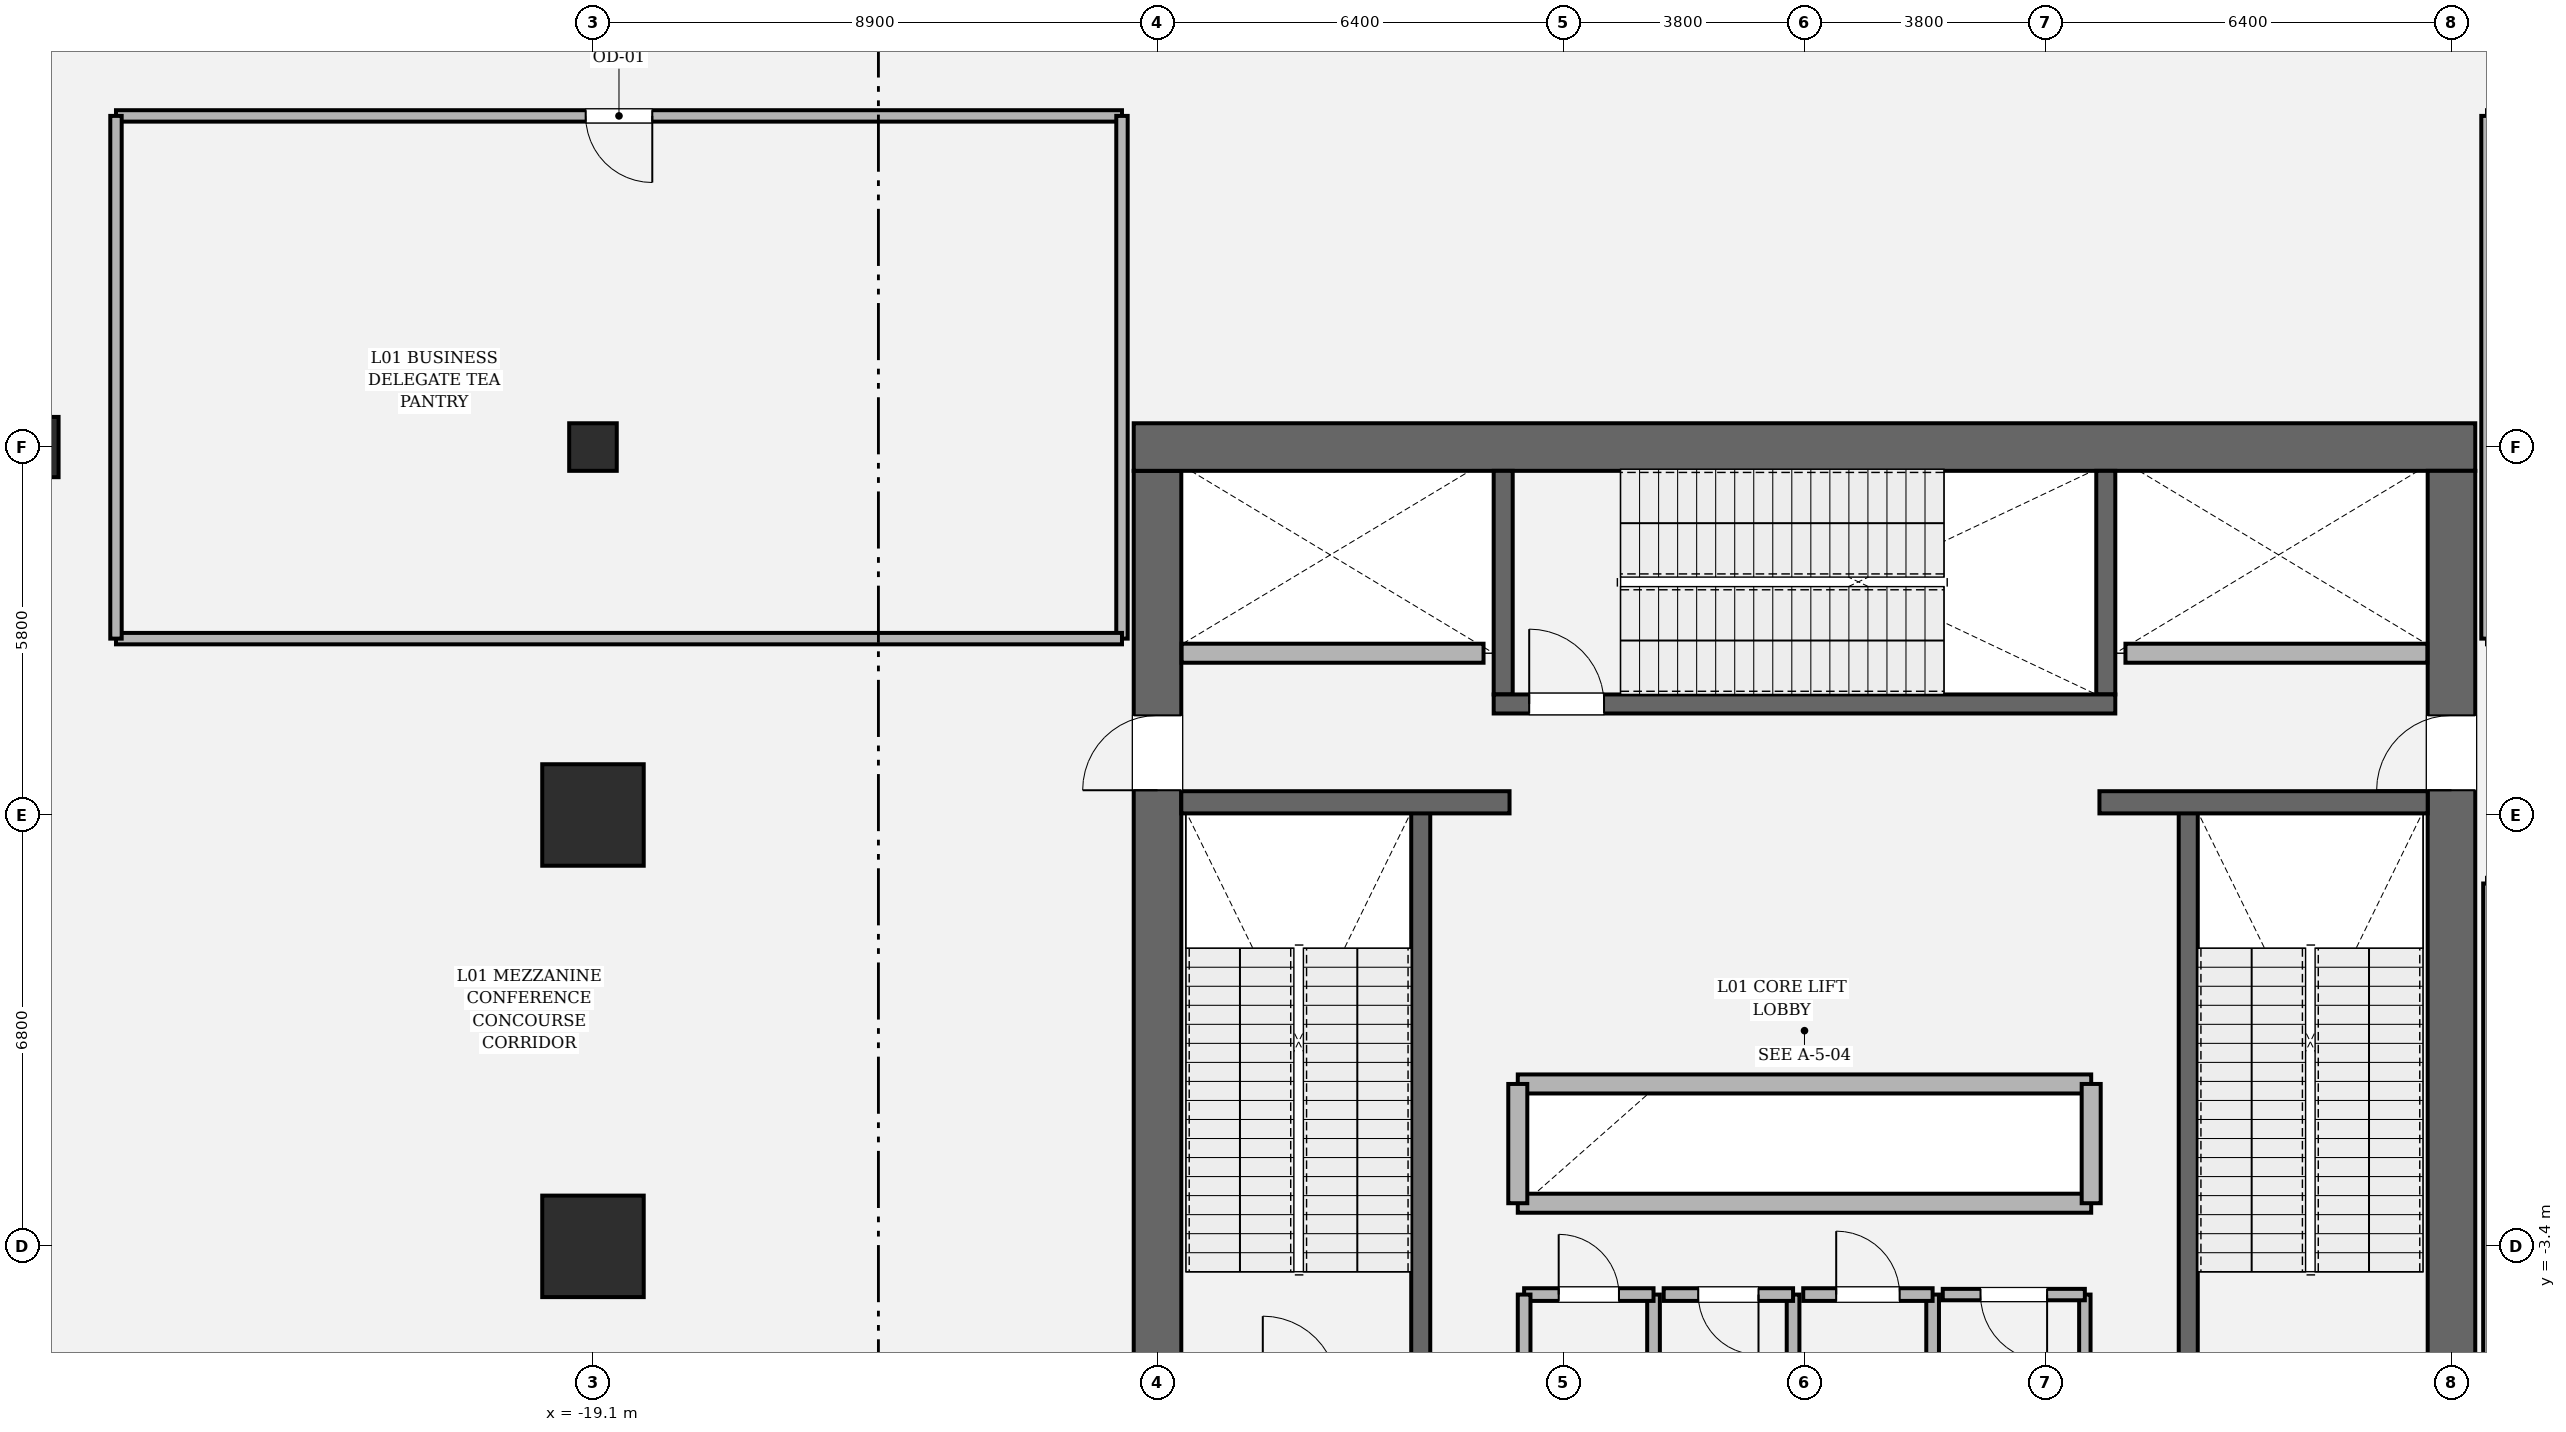
"""IFC4 building model, lengths in metres.
Left out: names, types, materials, properties, quantities, classifications, styles, units other than length and angle.
Written with IfcOpenShell. Run it as: python <this file> out.ifc"""

import sys

from ifc_helpers import new_model, si_unit, direction, frame, frame_2d, origin, origin_2d, place, context, subcontext, project, spatial, rectangle, hollow_rectangle, circle, extrude, element, fill, save


model = new_model("IFC4")
c1 = context("Model", 3, precision=1e-05, world=origin(), true_north=direction((0.0, 1.0)))
c2 = subcontext(c1, "Body", "Model", "MODEL_VIEW")
j1 = project(units=[si_unit("LENGTHUNIT", "METRE"), si_unit("PLANEANGLEUNIT", "RADIAN")], contexts=[c1])
p1 = place(None, origin())
s1 = spatial("IfcSite", under=j1, at=p1, CompositionType="ELEMENT")
p2 = place(p1, origin())
s2 = spatial("IfcBuilding", under=s1, at=p2, CompositionType="ELEMENT")
p3 = place(p2, frame((0.0, 0.0, 6.0)))
s3 = spatial("IfcBuildingStorey", under=s2, at=p3, CompositionType="ELEMENT", Elevation=6.0)
p4 = place(p3, frame((-10.2, -8.825, 0.0), z_axis=(0.0, 0.0, 1.0), x_axis=(0.0, 1.0, 0.0)))
e1 = element("IfcWall", 1, at=p4, inside=s3, PredefinedType="SHEAR", context=c2, shape_type="SweptSolid", body=[
    extrude(rectangle(XDim=17.65, YDim=0.75, at=frame_2d((8.825, 0.0))), origin(), (0.0, 0.0, 1.0), 5.4),
])
p5 = place(p4, frame((12.615, 0.0, 0.0)))
e2 = element("IfcOpeningElement", 2, at=p5, cuts=e1, PredefinedType="OPENING", context=c2, shape_type="SweptSolid", body=[
    extrude(rectangle(XDim=1.18, YDim=2.2, at=frame_2d((0.59, 1.1))), frame((0.0, 0.385, 0.0), z_axis=(0.0, -1.0, 0.0), x_axis=(1.0, 0.0, 0.0)), (0.0, 0.0, 1.0), 0.77),
])
p6 = place(p3, frame((-10.575, 9.2, 0.0), z_axis=(0.0, 0.0, 1.0), x_axis=(1.0, 0.0, 0.0)))
e3 = element("IfcWall", 3, at=p6, inside=s3, PredefinedType="SHEAR", context=c2, shape_type="SweptSolid", body=[
    extrude(rectangle(XDim=21.15, YDim=0.75, at=frame_2d((10.575, 0.0))), origin(), (0.0, 0.0, 1.0), 5.4),
])
p7 = place(p3, frame((10.2, 8.825, 0.0), z_axis=(0.0, 0.0, 1.0), x_axis=(0.0, -1.0, 0.0)))
e4 = element("IfcWall", 4, at=p7, inside=s3, PredefinedType="SHEAR", context=c2, shape_type="SweptSolid", body=[
    extrude(rectangle(XDim=17.65, YDim=0.75, at=frame_2d((8.825, 0.0))), origin(), (0.0, 0.0, 1.0), 5.4),
])
p8 = place(p7, frame((3.855, 0.0, 0.0)))
e5 = element("IfcOpeningElement", 5, at=p8, cuts=e4, PredefinedType="OPENING", context=c2, shape_type="SweptSolid", body=[
    extrude(rectangle(XDim=1.18, YDim=2.2, at=frame_2d((0.59, 1.1))), frame((0.0, 0.385, 0.0), z_axis=(0.0, -1.0, 0.0), x_axis=(1.0, 0.0, 0.0)), (0.0, 0.0, 1.0), 0.77),
])
for number, where, z_axis, x_axis in (
    (6, (-6.05, -5.5, 0.0), (0.0, 0.0, 1.0), (0.0, 1.0, 0.0)),
    (7, (6.05, 3.45, 0.0), (0.0, 0.0, 1.0), (0.0, -1.0, 0.0)),
):
    element("IfcWall", number, at=place(p3, frame(where, z_axis=z_axis, x_axis=x_axis)), inside=s3, PredefinedType="SOLIDWALL", context=c2, shape_type="SweptSolid", body=[
        extrude(rectangle(XDim=8.95, YDim=0.3, at=frame_2d((4.475, 0.0))), origin(), (0.0, 0.0, 1.0), 5.4),
    ])
for number, where, z_axis, x_axis in (
    (8, (-4.75, 5.3, 0.0), (0.0, 0.0, 1.0), (0.0, 1.0, 0.0)),
    (9, (4.75, 8.825, 0.0), (0.0, 0.0, 1.0), (0.0, -1.0, 0.0)),
):
    element("IfcWall", number, at=place(p3, frame(where, z_axis=z_axis, x_axis=x_axis)), inside=s3, PredefinedType="SOLIDWALL", context=c2, shape_type="SweptSolid", body=[
        extrude(rectangle(XDim=3.525, YDim=0.3, at=frame_2d((1.762, 0.0))), origin(), (0.0, 0.0, 1.0), 5.4),
    ])
p9 = place(p3, frame((-4.9, 5.15, 0.0), z_axis=(0.0, 0.0, 1.0), x_axis=(1.0, 0.0, 0.0)))
e10 = element("IfcWall", 10, at=p9, inside=s3, PredefinedType="SOLIDWALL", context=c2, shape_type="SweptSolid", body=[
    extrude(rectangle(XDim=9.8, YDim=0.3, at=frame_2d((4.9, 0.0))), origin(), (0.0, 0.0, 1.0), 5.4),
])
p10 = place(p9, frame((0.56, 0.0, 0.0)))
e11 = element("IfcOpeningElement", 11, at=p10, cuts=e10, PredefinedType="OPENING", context=c2, shape_type="SweptSolid", body=[
    extrude(rectangle(XDim=1.18, YDim=2.2, at=frame_2d((0.59, 1.1))), frame((0.0, 0.16, 0.0), z_axis=(0.0, -1.0, 0.0), x_axis=(1.0, 0.0, 0.0)), (0.0, 0.0, 1.0), 0.32),
])
for number, where, z_axis, x_axis in (
    (12, (-9.825, 3.6, 0.0), (0.0, 0.0, 1.0), (1.0, 0.0, 0.0)),
    (13, (4.65, 3.6, 0.0), (0.0, 0.0, 1.0), (1.0, 0.0, 0.0)),
):
    element("IfcWall", number, at=place(p3, frame(where, z_axis=z_axis, x_axis=x_axis)), inside=s3, PredefinedType="SOLIDWALL", context=c2, shape_type="SweptSolid", body=[
        extrude(rectangle(XDim=5.175, YDim=0.35, at=frame_2d((2.587, 0.0))), origin(), (0.0, 0.0, 1.0), 5.4),
    ])
for number, where, z_axis, x_axis in (
    (14, (-19.1, 3.4, 0.0), (0.0, 0.0, 1.0), (1.0, 0.0, 0.0)),
    (15, (-19.1, -3.4, 0.0), (0.0, 0.0, 1.0), (1.0, 0.0, 0.0)),
):
    element("IfcColumn", number, at=place(p3, frame(where, z_axis=z_axis, x_axis=x_axis)), inside=s3, PredefinedType="COLUMN", context=c2, shape_type="SweptSolid", body=[
        extrude(hollow_rectangle(XDim=1.6, YDim=1.6, WallThickness=0.05, at=origin_2d()), origin(), (0.0, 0.0, 1.0), 5.4),
    ])
p11 = place(p3, frame((-28.0, 9.2, 0.0), z_axis=(0.0, 0.0, 1.0), x_axis=(1.0, 0.0, 0.0)))
e16 = element("IfcColumn", 16, at=p11, inside=s3, PredefinedType="COLUMN", context=c2, shape_type="SweptSolid", body=[
    extrude(rectangle(XDim=0.95, YDim=0.95, at=origin_2d()), origin(), (0.0, 0.0, 1.0), 5.4),
])
p12 = place(p3, frame((-19.1, 9.2, 0.0), z_axis=(0.0, 0.0, 1.0), x_axis=(1.0, 0.0, 0.0)))
e17 = element("IfcColumn", 17, at=p12, inside=s3, PredefinedType="PILASTER", context=c2, shape_type="SweptSolid", body=[
    extrude(circle(Radius=0.375, at=origin_2d()), origin(), (0.0, 0.0, 1.0), 5.4),
])
for number, where, z_axis, x_axis in (
    (18, (-4.52, -0.84, 0.0), (0.0, 0.0, 1.0), (1.0, 0.0, 0.0)),
    (19, (-4.52, -2.72, 0.0), (0.0, 0.0, 1.0), (1.0, 0.0, 0.0)),
):
    element("IfcWall", number, at=place(p3, frame(where, z_axis=z_axis, x_axis=x_axis)), inside=s3, PredefinedType="SOLIDWALL", context=c2, shape_type="SweptSolid", body=[
        extrude(rectangle(XDim=9.04, YDim=0.3, at=frame_2d((4.52, 0.0))), origin(), (0.0, 0.0, 1.0), 5.12),
    ])
for number, where, z_axis, x_axis in (
    (20, (-4.52, -2.72, 0.0), (0.0, 0.0, 1.0), (0.0, 1.0, 0.0)),
    (21, (4.52, -2.72, 0.0), (0.0, 0.0, 1.0), (0.0, 1.0, 0.0)),
):
    element("IfcWall", number, at=place(p3, frame(where, z_axis=z_axis, x_axis=x_axis)), inside=s3, PredefinedType="SOLIDWALL", context=c2, shape_type="SweptSolid", body=[
        extrude(rectangle(XDim=1.88, YDim=0.3, at=frame_2d((0.94, 0.0))), origin(), (0.0, 0.0, 1.0), 5.12),
    ])
for number, where, z_axis, x_axis in (
    (22, (-9.82, 5.95, 0.0), (0.0, 0.0, 1.0), (1.0, 0.0, 0.0)),
    (23, (5.06, 5.95, 0.0), (0.0, 0.0, 1.0), (1.0, 0.0, 0.0)),
):
    element("IfcWall", number, at=place(p3, frame(where, z_axis=z_axis, x_axis=x_axis)), inside=s3, PredefinedType="SOLIDWALL", context=c2, shape_type="SweptSolid", body=[
        extrude(rectangle(XDim=4.76, YDim=0.3, at=frame_2d((2.38, 0.0))), origin(), (0.0, 0.0, 1.0), 5.12),
    ])
p13 = place(p3, frame((-2.38, -5.9, 0.0), z_axis=(0.0, 0.0, 1.0), x_axis=(0.0, 1.0, 0.0)))
e24 = element("IfcWall", 24, at=p13, inside=s3, PredefinedType="SOLIDWALL", context=c2, shape_type="SweptSolid", body=[
    extrude(rectangle(XDim=1.74, YDim=0.2, at=frame_2d((0.87, 0.0))), origin(), (0.0, 0.0, 1.0), 5.12),
])
p14 = place(p3, frame((-2.38, -4.16, 0.0), z_axis=(0.0, 0.0, 1.0), x_axis=(-1.0, 0.0, 0.0)))
e25 = element("IfcWall", 25, at=p14, inside=s3, PredefinedType="SOLIDWALL", context=c2, shape_type="SweptSolid", body=[
    extrude(rectangle(XDim=2.04, YDim=0.2, at=frame_2d((1.02, 0.0))), origin(), (0.0, 0.0, 1.0), 5.12),
])
p15 = place(p14, frame((0.545, 0.0, 0.0)))
e26 = element("IfcOpeningElement", 26, at=p15, cuts=e25, PredefinedType="OPENING", context=c2, shape_type="SweptSolid", body=[
    extrude(rectangle(XDim=0.95, YDim=2.15, at=frame_2d((0.475, 1.075))), frame((0.0, 0.11, 0.0), z_axis=(0.0, -1.0, 0.0), x_axis=(1.0, 0.0, 0.0)), (0.0, 0.0, 1.0), 0.22),
])
for number, where, z_axis, x_axis in (
    (27, (-4.42, -4.16, 0.0), (0.0, 0.0, 1.0), (0.0, -1.0, 0.0)),
    (28, (-0.18, -5.9, 0.0), (0.0, 0.0, 1.0), (0.0, 1.0, 0.0)),
):
    element("IfcWall", number, at=place(p3, frame(where, z_axis=z_axis, x_axis=x_axis)), inside=s3, PredefinedType="SOLIDWALL", context=c2, shape_type="SweptSolid", body=[
        extrude(rectangle(XDim=1.74, YDim=0.2, at=frame_2d((0.87, 0.0))), origin(), (0.0, 0.0, 1.0), 5.12),
    ])
p16 = place(p3, frame((-0.18, -4.16, 0.0), z_axis=(0.0, 0.0, 1.0), x_axis=(-1.0, 0.0, 0.0)))
e29 = element("IfcWall", 29, at=p16, inside=s3, PredefinedType="SOLIDWALL", context=c2, shape_type="SweptSolid", body=[
    extrude(rectangle(XDim=2.04, YDim=0.2, at=frame_2d((1.02, 0.0))), origin(), (0.0, 0.0, 1.0), 5.12),
])
p17 = place(p16, frame((0.545, 0.0, 0.0)))
e30 = element("IfcOpeningElement", 30, at=p17, cuts=e29, PredefinedType="OPENING", context=c2, shape_type="SweptSolid", body=[
    extrude(rectangle(XDim=0.95, YDim=2.15, at=frame_2d((0.475, 1.075))), frame((0.0, 0.11, 0.0), z_axis=(0.0, -1.0, 0.0), x_axis=(1.0, 0.0, 0.0)), (0.0, 0.0, 1.0), 0.22),
])
p18 = place(p3, frame((2.02, -5.9, 0.0), z_axis=(0.0, 0.0, 1.0), x_axis=(0.0, 1.0, 0.0)))
e31 = element("IfcWall", 31, at=p18, inside=s3, PredefinedType="SOLIDWALL", context=c2, shape_type="SweptSolid", body=[
    extrude(rectangle(XDim=1.74, YDim=0.2, at=frame_2d((0.87, 0.0))), origin(), (0.0, 0.0, 1.0), 5.12),
])
p19 = place(p3, frame((2.02, -4.16, 0.0), z_axis=(0.0, 0.0, 1.0), x_axis=(-1.0, 0.0, 0.0)))
e32 = element("IfcWall", 32, at=p19, inside=s3, PredefinedType="SOLIDWALL", context=c2, shape_type="SweptSolid", body=[
    extrude(rectangle(XDim=2.04, YDim=0.2, at=frame_2d((1.02, 0.0))), origin(), (0.0, 0.0, 1.0), 5.12),
])
p20 = place(p19, frame((0.52, 0.0, 0.0)))
e33 = element("IfcOpeningElement", 33, at=p20, cuts=e32, PredefinedType="OPENING", context=c2, shape_type="SweptSolid", body=[
    extrude(rectangle(XDim=1.0, YDim=2.15, at=frame_2d((0.5, 1.075))), frame((0.0, 0.11, 0.0), z_axis=(0.0, -1.0, 0.0), x_axis=(1.0, 0.0, 0.0)), (0.0, 0.0, 1.0), 0.22),
])
p21 = place(p3, frame((4.42, -5.9, 0.0), z_axis=(0.0, 0.0, 1.0), x_axis=(0.0, 1.0, 0.0)))
e34 = element("IfcWall", 34, at=p21, inside=s3, PredefinedType="PARTITIONING", context=c2, shape_type="SweptSolid", body=[
    extrude(rectangle(XDim=1.74, YDim=0.18, at=frame_2d((0.87, 0.0))), origin(), (0.0, 0.0, 1.0), 5.12),
])
p22 = place(p3, frame((4.42, -4.16, 0.0), z_axis=(0.0, 0.0, 1.0), x_axis=(-1.0, 0.0, 0.0)))
e35 = element("IfcWall", 35, at=p22, inside=s3, PredefinedType="PARTITIONING", context=c2, shape_type="SweptSolid", body=[
    extrude(rectangle(XDim=2.24, YDim=0.18, at=frame_2d((1.12, 0.0))), origin(), (0.0, 0.0, 1.0), 5.12),
])
p23 = place(p22, frame((0.595, 0.0, 0.0)))
e36 = element("IfcOpeningElement", 36, at=p23, cuts=e35, PredefinedType="OPENING", context=c2, shape_type="SweptSolid", body=[
    extrude(rectangle(XDim=1.05, YDim=2.2, at=frame_2d((0.525, 1.1))), frame((0.0, 0.1, 0.0), z_axis=(0.0, -1.0, 0.0), x_axis=(1.0, 0.0, 0.0)), (0.0, 0.0, 1.0), 0.2),
])
p24 = place(p3, frame((-26.62, 14.42, 0.0), z_axis=(0.0, 0.0, 1.0), x_axis=(1.0, 0.0, 0.0)))
e37 = element("IfcWall", 37, at=p24, inside=s3, PredefinedType="PARTITIONING", context=c2, shape_type="SweptSolid", body=[
    extrude(rectangle(XDim=15.86, YDim=0.18, at=frame_2d((7.93, 0.0))), origin(), (0.0, 0.0, 1.0), 4.414),
])
p25 = place(p24, frame((7.405, 0.0, 0.0)))
e38 = element("IfcOpeningElement", 38, at=p25, cuts=e37, PredefinedType="OPENING", context=c2, shape_type="SweptSolid", body=[
    extrude(rectangle(XDim=1.05, YDim=2.2, at=frame_2d((0.525, 1.1))), frame((0.0, 0.1, 0.0), z_axis=(0.0, -1.0, 0.0), x_axis=(1.0, 0.0, 0.0)), (0.0, 0.0, 1.0), 0.2),
])
p26 = place(p3, frame((-10.76, 14.42, 0.0), z_axis=(0.0, 0.0, 1.0), x_axis=(0.0, -1.0, 0.0)))
e39 = element("IfcWall", 39, at=p26, inside=s3, PredefinedType="PARTITIONING", context=c2, shape_type="SweptSolid", body=[
    extrude(rectangle(XDim=8.24, YDim=0.18, at=frame_2d((4.12, 0.0))), origin(), (0.0, 0.0, 1.0), 4.414),
])
p27 = place(p3, frame((-10.76, 6.18, 0.0), z_axis=(0.0, 0.0, 1.0), x_axis=(-1.0, 0.0, 0.0)))
e40 = element("IfcWall", 40, at=p27, inside=s3, PredefinedType="PARTITIONING", context=c2, shape_type="SweptSolid", body=[
    extrude(rectangle(XDim=15.86, YDim=0.18, at=frame_2d((7.93, 0.0))), origin(), (0.0, 0.0, 1.0), 4.414),
])
for number, where, z_axis, x_axis in (
    (41, (-26.62, 6.18, 0.0), (0.0, 0.0, 1.0), (0.0, 1.0, 0.0)),
    (42, (10.76, 6.18, 0.0), (0.0, 0.0, 1.0), (0.0, 1.0, 0.0)),
):
    element("IfcWall", number, at=place(p3, frame(where, z_axis=z_axis, x_axis=x_axis)), inside=s3, PredefinedType="PARTITIONING", context=c2, shape_type="SweptSolid", body=[
        extrude(rectangle(XDim=8.24, YDim=0.18, at=frame_2d((4.12, 0.0))), origin(), (0.0, 0.0, 1.0), 4.414),
    ])
p28 = place(p3, frame((10.76, -10.02, 0.0), z_axis=(0.0, 0.0, 1.0), x_axis=(0.0, 1.0, 0.0)))
e43 = element("IfcWall", 43, at=p28, inside=s3, PredefinedType="PARTITIONING", context=c2, shape_type="SweptSolid", body=[
    extrude(rectangle(XDim=12.34, YDim=0.12, at=frame_2d((6.17, 0.0))), origin(), (0.0, 0.0, 1.0), 4.414),
])
p29 = place(p10, origin())
e44 = element("IfcDoor", 44, at=p29, inside=s3, OperationType="SINGLE_SWING_LEFT", PredefinedType="DOOR", context=c2, shape_type="SweptSolid", body=[
    extrude(rectangle(XDim=1.18, YDim=2.2, at=frame_2d((0.59, 1.1))), frame((0.0, 0.025, 0.0), z_axis=(0.0, -1.0, 0.0), x_axis=(1.0, 0.0, 0.0)), (0.0, 0.0, 1.0), 0.05),
])
fill(e11, e44)
p30 = place(p5, origin())
e45 = element("IfcDoor", 45, at=p30, inside=s3, OperationType="SINGLE_SWING_LEFT", PredefinedType="DOOR", context=c2, shape_type="SweptSolid", body=[
    extrude(rectangle(XDim=1.18, YDim=2.2, at=frame_2d((0.59, 1.1))), frame((0.0, 0.025, 0.0), z_axis=(0.0, -1.0, 0.0), x_axis=(1.0, 0.0, 0.0)), (0.0, 0.0, 1.0), 0.05),
])
fill(e2, e45)
p31 = place(p8, origin())
e46 = element("IfcDoor", 46, at=p31, inside=s3, OperationType="SINGLE_SWING_RIGHT", PredefinedType="DOOR", context=c2, shape_type="SweptSolid", body=[
    extrude(rectangle(XDim=1.18, YDim=2.2, at=frame_2d((0.59, 1.1))), frame((0.0, 0.025, 0.0), z_axis=(0.0, -1.0, 0.0), x_axis=(1.0, 0.0, 0.0)), (0.0, 0.0, 1.0), 0.05),
])
fill(e5, e46)
p32 = place(p15, origin())
e47 = element("IfcDoor", 47, at=p32, inside=s3, OperationType="SINGLE_SWING_RIGHT", PredefinedType="DOOR", context=c2, shape_type="SweptSolid", body=[
    extrude(rectangle(XDim=0.95, YDim=2.15, at=frame_2d((0.475, 1.075))), frame((0.0, 0.025, 0.0), z_axis=(0.0, -1.0, 0.0), x_axis=(1.0, 0.0, 0.0)), (0.0, 0.0, 1.0), 0.05),
])
fill(e26, e47)
p33 = place(p17, origin())
e48 = element("IfcDoor", 48, at=p33, inside=s3, OperationType="SINGLE_SWING_LEFT", PredefinedType="DOOR", context=c2, shape_type="SweptSolid", body=[
    extrude(rectangle(XDim=0.95, YDim=2.15, at=frame_2d((0.475, 1.075))), frame((0.0, 0.025, 0.0), z_axis=(0.0, -1.0, 0.0), x_axis=(1.0, 0.0, 0.0)), (0.0, 0.0, 1.0), 0.05),
])
fill(e30, e48)
p34 = place(p20, origin())
e49 = element("IfcDoor", 49, at=p34, inside=s3, OperationType="SINGLE_SWING_RIGHT", PredefinedType="DOOR", context=c2, shape_type="SweptSolid", body=[
    extrude(rectangle(XDim=1.0, YDim=2.15, at=frame_2d((0.5, 1.075))), frame((0.0, 0.025, 0.0), z_axis=(0.0, -1.0, 0.0), x_axis=(1.0, 0.0, 0.0)), (0.0, 0.0, 1.0), 0.05),
])
fill(e33, e49)
p35 = place(p23, origin())
e50 = element("IfcDoor", 50, at=p35, inside=s3, OperationType="SINGLE_SWING_LEFT", PredefinedType="DOOR", context=c2, shape_type="SweptSolid", body=[
    extrude(rectangle(XDim=1.05, YDim=2.2, at=frame_2d((0.525, 1.1))), frame((0.0, 0.025, 0.0), z_axis=(0.0, -1.0, 0.0), x_axis=(1.0, 0.0, 0.0)), (0.0, 0.0, 1.0), 0.05),
])
fill(e36, e50)
p36 = place(p25, origin())
e51 = element("IfcDoor", 51, at=p36, inside=s3, OperationType="SINGLE_SWING_RIGHT", PredefinedType="DOOR", context=c2, shape_type="SweptSolid", body=[
    extrude(rectangle(XDim=1.05, YDim=2.2, at=frame_2d((0.525, 1.1))), frame((0.0, 0.025, 0.0), z_axis=(0.0, -1.0, 0.0), x_axis=(1.0, 0.0, 0.0)), (0.0, 0.0, 1.0), 0.05),
])
fill(e38, e51)
save(model, sys.argv[1])
